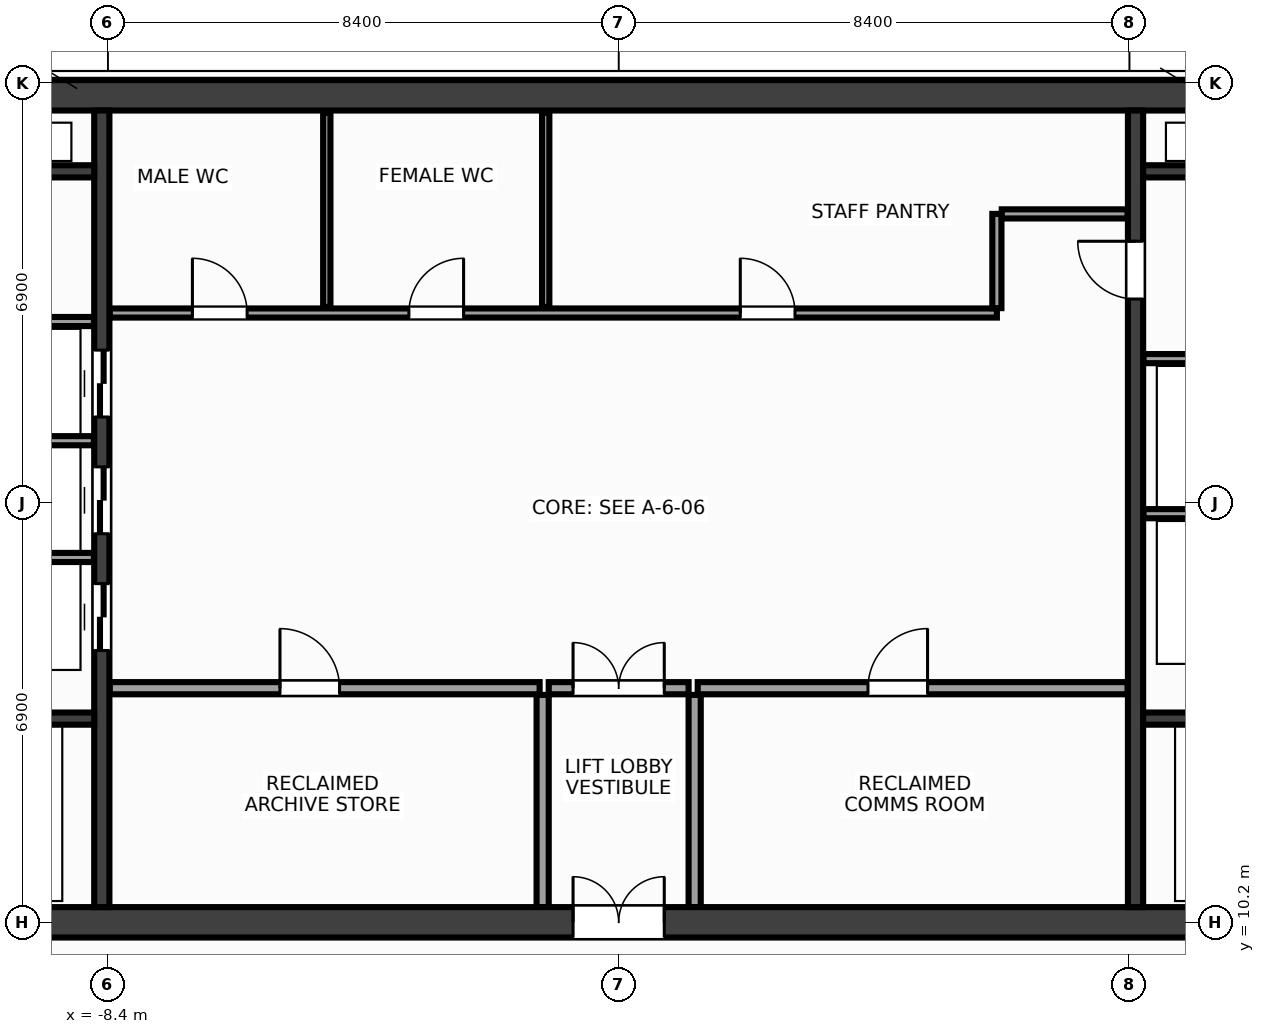
"""IFC4 building model, lengths in metres.
Left out: names, types, materials, properties, quantities, classifications, styles, units other than length and angle.
Written with IfcOpenShell. Run it as: python <this file> out.ifc"""

import sys

from ifc_helpers import new_model, si_unit, direction, frame, frame_2d, origin, place, context, subcontext, project, spatial, rectangle, extrude, source, transform, mapped, element, fill, save


model = new_model("IFC4")
c1 = context("Model", 3, precision=1e-05, world=origin(), true_north=direction((0.0, 1.0)))
c2 = subcontext(c1, "Body", "Model", "MODEL_VIEW")
j1 = project(units=[si_unit("LENGTHUNIT", "METRE"), si_unit("PLANEANGLEUNIT", "RADIAN")], contexts=[c1])
p1 = place(None, origin())
s1 = spatial("IfcSite", under=j1, at=p1, CompositionType="ELEMENT")
p2 = place(p1, origin())
s2 = spatial("IfcBuilding", under=s1, at=p2, CompositionType="ELEMENT")
p3 = place(p2, frame((0.0, 0.0, 264.8)))
s3 = spatial("IfcBuildingStorey", under=s2, at=p3, CompositionType="ELEMENT", Elevation=264.8)
m1 = source(origin(), c2, "Body", "SweptSolid", [
    extrude(rectangle(XDim=31.7, YDim=0.5, at=frame_2d((15.85, 0.0))), origin(), (0.0, 0.0, 1.0), 3.6),
])
p4 = place(p3, frame((-15.85, 23.8, 0.0), z_axis=(0.0, 0.0, 1.0), x_axis=(1.0, 0.0, 0.0)))
e1 = element("IfcWall", 1, at=p4, inside=s3, PredefinedType="SHEAR", context=c2, shape_type="MappedRepresentation", body=[
    mapped(m1, transform((0.0, 0.0, 0.0), x_axis=(1.0, 0.0, 0.0), y_axis=(0.0, 1.0, 0.0), z_axis=(0.0, 0.0, 1.0), scale=1.0)),
])
p5 = place(p3, frame((-15.85, 10.2, 0.0), z_axis=(0.0, 0.0, 1.0), x_axis=(1.0, 0.0, 0.0)))
e2 = element("IfcWall", 2, at=p5, inside=s3, PredefinedType="SHEAR", context=c2, shape_type="MappedRepresentation", body=[
    mapped(m1, transform((0.0, 0.0, 0.0), x_axis=(1.0, 0.0, 0.0), y_axis=(0.0, 1.0, 0.0), z_axis=(0.0, 0.0, 1.0), scale=1.0)),
])
p6 = place(p5, frame((1.7, 0.0, 0.0)))
e3 = element("IfcOpeningElement", 3, at=p6, cuts=e2, PredefinedType="OPENING", context=c2, shape_type="SweptSolid", body=[
    extrude(rectangle(XDim=1.6, YDim=2.15, at=frame_2d((0.8, 1.075))), frame((0.0, 0.262, 0.0), z_axis=(0.0, -1.0, 0.0), x_axis=(1.0, 0.0, 0.0)), (0.0, 0.0, 1.0), 0.524),
])
p7 = place(p5, frame((28.4, 0.0, 0.0)))
e4 = element("IfcOpeningElement", 4, at=p7, cuts=e2, PredefinedType="OPENING", context=c2, shape_type="SweptSolid", body=[
    extrude(rectangle(XDim=1.6, YDim=2.15, at=frame_2d((0.8, 1.075))), frame((0.0, 0.262, 0.0), z_axis=(0.0, -1.0, 0.0), x_axis=(1.0, 0.0, 0.0)), (0.0, 0.0, 1.0), 0.524),
])
p8 = place(p5, frame((15.1, 0.0, 0.0)))
e5 = element("IfcOpeningElement", 5, at=p8, cuts=e2, PredefinedType="OPENING", context=c2, shape_type="SweptSolid", body=[
    extrude(rectangle(XDim=1.5, YDim=2.2, at=frame_2d((0.75, 1.1))), frame((0.0, 0.262, 0.0), z_axis=(0.0, -1.0, 0.0), x_axis=(1.0, 0.0, 0.0)), (0.0, 0.0, 1.0), 0.524),
])
m2 = source(origin(), c2, "Body", "SweptSolid", [
    extrude(rectangle(XDim=13.1, YDim=0.25, at=frame_2d((6.55, 0.0))), origin(), (0.0, 0.0, 1.0), 3.6),
])
p9 = place(p3, frame((-8.5, 10.45, 0.0), z_axis=(0.0, 0.0, 1.0), x_axis=(0.0, 1.0, 0.0)))
e6 = element("IfcWall", 6, at=p9, inside=s3, PredefinedType="SHEAR", context=c2, shape_type="MappedRepresentation", body=[
    mapped(m2, transform((0.0, 0.0, 0.0), x_axis=(1.0, 0.0, 0.0), y_axis=(0.0, 1.0, 0.0), z_axis=(0.0, 0.0, 1.0), scale=1.0)),
])
p10 = place(p9, frame((4.22, 0.0, 0.0)))
e7 = element("IfcOpeningElement", 7, at=p10, cuts=e6, PredefinedType="OPENING", context=c2, shape_type="SweptSolid", body=[
    extrude(rectangle(XDim=1.1, YDim=2.15, at=frame_2d((0.55, 1.075))), frame((0.0, 0.137, 0.0), z_axis=(0.0, -1.0, 0.0), x_axis=(1.0, 0.0, 0.0)), (0.0, 0.0, 1.0), 0.274),
])
p11 = place(p9, frame((6.14, 0.0, 0.0)))
e8 = element("IfcOpeningElement", 8, at=p11, cuts=e6, PredefinedType="OPENING", context=c2, shape_type="SweptSolid", body=[
    extrude(rectangle(XDim=1.1, YDim=2.15, at=frame_2d((0.55, 1.075))), frame((0.0, 0.137, 0.0), z_axis=(0.0, -1.0, 0.0), x_axis=(1.0, 0.0, 0.0)), (0.0, 0.0, 1.0), 0.274),
])
p12 = place(p9, frame((8.06, 0.0, 0.0)))
e9 = element("IfcOpeningElement", 9, at=p12, cuts=e6, PredefinedType="OPENING", context=c2, shape_type="SweptSolid", body=[
    extrude(rectangle(XDim=1.1, YDim=2.15, at=frame_2d((0.55, 1.075))), frame((0.0, 0.137, 0.0), z_axis=(0.0, -1.0, 0.0), x_axis=(1.0, 0.0, 0.0)), (0.0, 0.0, 1.0), 0.274),
])
p13 = place(p3, frame((8.5, 10.45, 0.0), z_axis=(0.0, 0.0, 1.0), x_axis=(0.0, 1.0, 0.0)))
e10 = element("IfcWall", 10, at=p13, inside=s3, PredefinedType="SHEAR", context=c2, shape_type="MappedRepresentation", body=[
    mapped(m2, transform((0.0, 0.0, 0.0), x_axis=(1.0, 0.0, 0.0), y_axis=(0.0, 1.0, 0.0), z_axis=(0.0, 0.0, 1.0), scale=1.0)),
])
p14 = place(p13, frame((10.0, 0.0, 0.0)))
e11 = element("IfcOpeningElement", 11, at=p14, cuts=e10, PredefinedType="OPENING", context=c2, shape_type="SweptSolid", body=[
    extrude(rectangle(XDim=0.95, YDim=2.15, at=frame_2d((0.475, 1.075))), frame((0.0, 0.137, 0.0), z_axis=(0.0, -1.0, 0.0), x_axis=(1.0, 0.0, 0.0)), (0.0, 0.0, 1.0), 0.274),
])
m3 = source(origin(), c2, "Body", "SweptSolid", [
    extrude(rectangle(XDim=2.825, YDim=0.2, at=frame_2d((1.413, 0.0))), origin(), (0.0, 0.0, 1.0), 3.6),
])
for number, where, z_axis, x_axis in (
    (12, (-11.45, 13.55, 0.0), (0.0, 0.0, 1.0), (1.0, 0.0, 0.0)),
    (13, (8.625, 13.55, 0.0), (0.0, 0.0, 1.0), (1.0, 0.0, 0.0)),
):
    element("IfcWall", number, at=place(p3, frame(where, z_axis=z_axis, x_axis=x_axis)), inside=s3, PredefinedType="SHEAR", context=c2, shape_type="MappedRepresentation", body=[
        mapped(m3, transform((0.0, 0.0, 0.0), x_axis=(1.0, 0.0, 0.0), y_axis=(0.0, 1.0, 0.0), z_axis=(0.0, 0.0, 1.0), scale=1.0)),
    ])
m4 = source(origin(), c2, "Body", "SweptSolid", [
    extrude(rectangle(XDim=3.02, YDim=0.2, at=frame_2d((1.51, 0.0))), origin(), (0.0, 0.0, 1.0), 3.6),
])
for number, where, z_axis, x_axis in (
    (14, (-11.645, 22.55, 0.0), (0.0, 0.0, 1.0), (1.0, 0.0, 0.0)),
    (15, (8.625, 22.55, 0.0), (0.0, 0.0, 1.0), (1.0, 0.0, 0.0)),
):
    element("IfcWall", number, at=place(p3, frame(where, z_axis=z_axis, x_axis=x_axis)), inside=s3, PredefinedType="SHEAR", context=c2, shape_type="MappedRepresentation", body=[
        mapped(m4, transform((0.0, 0.0, 0.0), x_axis=(1.0, 0.0, 0.0), y_axis=(0.0, 1.0, 0.0), z_axis=(0.0, 0.0, 1.0), scale=1.0)),
    ])
m5 = source(origin(), c2, "Body", "SweptSolid", [
    extrude(rectangle(XDim=3.01, YDim=0.15, at=frame_2d((1.505, 0.0))), origin(), (0.0, 0.0, 1.0), 3.37),
])
for number, where, z_axis, x_axis in (
    (16, (-11.64, 16.2, 0.0), (0.0, 0.0, 1.0), (1.0, 0.0, 0.0)),
    (17, (-11.64, 18.12, 0.0), (0.0, 0.0, 1.0), (1.0, 0.0, 0.0)),
    (18, (-11.64, 20.08, 0.0), (0.0, 0.0, 1.0), (1.0, 0.0, 0.0)),
    (19, (8.63, 16.92, 0.0), (0.0, 0.0, 1.0), (1.0, 0.0, 0.0)),
    (20, (8.63, 19.47, 0.0), (0.0, 0.0, 1.0), (1.0, 0.0, 0.0)),
):
    element("IfcWall", number, at=place(p3, frame(where, z_axis=z_axis, x_axis=x_axis)), inside=s3, PredefinedType="PARTITIONING", context=c2, shape_type="MappedRepresentation", body=[
        mapped(m5, transform((0.0, 0.0, 0.0), x_axis=(1.0, 0.0, 0.0), y_axis=(0.0, 1.0, 0.0), z_axis=(0.0, 0.0, 1.0), scale=1.0)),
    ])
m6 = source(origin(), c2, "Body", "SweptSolid", [
    extrude(rectangle(XDim=7.07, YDim=0.2, at=frame_2d((3.535, 0.0))), origin(), (0.0, 0.0, 1.0), 3.37),
])
p15 = place(p3, frame((-8.37, 14.05, 0.0), z_axis=(0.0, 0.0, 1.0), x_axis=(1.0, 0.0, 0.0)))
e21 = element("IfcWall", 21, at=p15, inside=s3, PredefinedType="PARTITIONING", context=c2, shape_type="MappedRepresentation", body=[
    mapped(m6, transform((0.0, 0.0, 0.0), x_axis=(1.0, 0.0, 0.0), y_axis=(0.0, 1.0, 0.0), z_axis=(0.0, 0.0, 1.0), scale=1.0)),
])
p16 = place(p15, frame((2.8, 0.0, 0.0)))
e22 = element("IfcOpeningElement", 22, at=p16, cuts=e21, PredefinedType="OPENING", context=c2, shape_type="SweptSolid", body=[
    extrude(rectangle(XDim=0.98, YDim=2.15, at=frame_2d((0.49, 1.075))), frame((0.0, 0.112, 0.0), z_axis=(0.0, -1.0, 0.0), x_axis=(1.0, 0.0, 0.0)), (0.0, 0.0, 1.0), 0.224),
])
p17 = place(p3, frame((1.3, 14.05, 0.0), z_axis=(0.0, 0.0, 1.0), x_axis=(1.0, 0.0, 0.0)))
e23 = element("IfcWall", 23, at=p17, inside=s3, PredefinedType="PARTITIONING", context=c2, shape_type="MappedRepresentation", body=[
    mapped(m6, transform((0.0, 0.0, 0.0), x_axis=(1.0, 0.0, 0.0), y_axis=(0.0, 1.0, 0.0), z_axis=(0.0, 0.0, 1.0), scale=1.0)),
])
p18 = place(p17, frame((2.8, 0.0, 0.0)))
e24 = element("IfcOpeningElement", 24, at=p18, cuts=e23, PredefinedType="OPENING", context=c2, shape_type="SweptSolid", body=[
    extrude(rectangle(XDim=0.98, YDim=2.15, at=frame_2d((0.49, 1.075))), frame((0.0, 0.112, 0.0), z_axis=(0.0, -1.0, 0.0), x_axis=(1.0, 0.0, 0.0)), (0.0, 0.0, 1.0), 0.224),
])
m7 = source(origin(), c2, "Body", "SweptSolid", [
    extrude(rectangle(XDim=3.49, YDim=0.2, at=frame_2d((1.745, 0.0))), origin(), (0.0, 0.0, 1.0), 3.37),
])
for number, where, z_axis, x_axis in (
    (25, (-1.25, 10.45, 0.0), (0.0, 0.0, 1.0), (0.0, 1.0, 0.0)),
    (26, (1.25, 10.45, 0.0), (0.0, 0.0, 1.0), (0.0, 1.0, 0.0)),
):
    element("IfcWall", number, at=place(p3, frame(where, z_axis=z_axis, x_axis=x_axis)), inside=s3, PredefinedType="PARTITIONING", context=c2, shape_type="MappedRepresentation", body=[
        mapped(m7, transform((0.0, 0.0, 0.0), x_axis=(1.0, 0.0, 0.0), y_axis=(0.0, 1.0, 0.0), z_axis=(0.0, 0.0, 1.0), scale=1.0)),
    ])
m8 = source(origin(), c2, "Body", "SweptSolid", [
    extrude(rectangle(XDim=2.3, YDim=0.2, at=frame_2d((1.15, 0.0))), origin(), (0.0, 0.0, 1.0), 3.37),
])
p19 = place(p3, frame((-1.15, 14.05, 0.0), z_axis=(0.0, 0.0, 1.0), x_axis=(1.0, 0.0, 0.0)))
e27 = element("IfcWall", 27, at=p19, inside=s3, PredefinedType="PARTITIONING", context=c2, shape_type="MappedRepresentation", body=[
    mapped(m8, transform((0.0, 0.0, 0.0), x_axis=(1.0, 0.0, 0.0), y_axis=(0.0, 1.0, 0.0), z_axis=(0.0, 0.0, 1.0), scale=1.0)),
])
p20 = place(p19, frame((0.4, 0.0, 0.0)))
e28 = element("IfcOpeningElement", 28, at=p20, cuts=e27, PredefinedType="OPENING", context=c2, shape_type="SweptSolid", body=[
    extrude(rectangle(XDim=1.5, YDim=2.2, at=frame_2d((0.75, 1.1))), frame((0.0, 0.112, 0.0), z_axis=(0.0, -1.0, 0.0), x_axis=(1.0, 0.0, 0.0)), (0.0, 0.0, 1.0), 0.224),
])
m9 = source(origin(), c2, "Body", "SweptSolid", [
    extrude(rectangle(XDim=14.59, YDim=0.15, at=frame_2d((7.295, 0.0))), origin(), (0.0, 0.0, 1.0), 3.37),
])
p21 = place(p3, frame((-8.37, 20.22, 0.0), z_axis=(0.0, 0.0, 1.0), x_axis=(1.0, 0.0, 0.0)))
e29 = element("IfcWall", 29, at=p21, inside=s3, PredefinedType="PARTITIONING", context=c2, shape_type="MappedRepresentation", body=[
    mapped(m9, transform((0.0, 0.0, 0.0), x_axis=(1.0, 0.0, 0.0), y_axis=(0.0, 1.0, 0.0), z_axis=(0.0, 0.0, 1.0), scale=1.0)),
])
p22 = place(p21, frame((1.36, 0.0, 0.0)))
e30 = element("IfcOpeningElement", 30, at=p22, cuts=e29, PredefinedType="OPENING", context=c2, shape_type="SweptSolid", body=[
    extrude(rectangle(XDim=0.9, YDim=2.15, at=frame_2d((0.45, 1.075))), frame((0.0, 0.087, 0.0), z_axis=(0.0, -1.0, 0.0), x_axis=(1.0, 0.0, 0.0)), (0.0, 0.0, 1.0), 0.174),
])
p23 = place(p21, frame((4.92, 0.0, 0.0)))
e31 = element("IfcOpeningElement", 31, at=p23, cuts=e29, PredefinedType="OPENING", context=c2, shape_type="SweptSolid", body=[
    extrude(rectangle(XDim=0.9, YDim=2.15, at=frame_2d((0.45, 1.075))), frame((0.0, 0.087, 0.0), z_axis=(0.0, -1.0, 0.0), x_axis=(1.0, 0.0, 0.0)), (0.0, 0.0, 1.0), 0.174),
])
p24 = place(p21, frame((10.37, 0.0, 0.0)))
e32 = element("IfcOpeningElement", 32, at=p24, cuts=e29, PredefinedType="OPENING", context=c2, shape_type="SweptSolid", body=[
    extrude(rectangle(XDim=0.9, YDim=2.15, at=frame_2d((0.45, 1.075))), frame((0.0, 0.087, 0.0), z_axis=(0.0, -1.0, 0.0), x_axis=(1.0, 0.0, 0.0)), (0.0, 0.0, 1.0), 0.174),
])
m10 = source(origin(), c2, "Body", "SweptSolid", [
    extrude(rectangle(XDim=1.55, YDim=0.15, at=frame_2d((0.775, 0.0))), origin(), (0.0, 0.0, 1.0), 3.37),
])
p25 = place(p3, frame((6.22, 20.3, 0.0), z_axis=(0.0, 0.0, 1.0), x_axis=(0.0, 1.0, 0.0)))
e33 = element("IfcWall", 33, at=p25, inside=s3, PredefinedType="PARTITIONING", context=c2, shape_type="MappedRepresentation", body=[
    mapped(m10, transform((0.0, 0.0, 0.0), x_axis=(1.0, 0.0, 0.0), y_axis=(0.0, 1.0, 0.0), z_axis=(0.0, 0.0, 1.0), scale=1.0)),
])
m11 = source(origin(), c2, "Body", "SweptSolid", [
    extrude(rectangle(XDim=2.07, YDim=0.15, at=frame_2d((1.035, 0.0))), origin(), (0.0, 0.0, 1.0), 3.37),
])
p26 = place(p3, frame((6.3, 21.85, 0.0), z_axis=(0.0, 0.0, 1.0), x_axis=(1.0, 0.0, 0.0)))
e34 = element("IfcWall", 34, at=p26, inside=s3, PredefinedType="PARTITIONING", context=c2, shape_type="MappedRepresentation", body=[
    mapped(m11, transform((0.0, 0.0, 0.0), x_axis=(1.0, 0.0, 0.0), y_axis=(0.0, 1.0, 0.0), z_axis=(0.0, 0.0, 1.0), scale=1.0)),
])
m12 = source(origin(), c2, "Body", "SweptSolid", [
    extrude(rectangle(XDim=3.19, YDim=0.12, at=frame_2d((1.595, 0.0))), origin(), (0.0, 0.0, 1.0), 3.37),
])
for number, where, z_axis, x_axis in (
    (35, (-4.8, 20.32, 0.0), (0.0, 0.0, 1.0), (0.0, 1.0, 0.0)),
    (36, (-1.2, 20.32, 0.0), (0.0, 0.0, 1.0), (0.0, 1.0, 0.0)),
):
    element("IfcWall", number, at=place(p3, frame(where, z_axis=z_axis, x_axis=x_axis)), inside=s3, PredefinedType="PARTITIONING", context=c2, shape_type="MappedRepresentation", body=[
        mapped(m12, transform((0.0, 0.0, 0.0), x_axis=(1.0, 0.0, 0.0), y_axis=(0.0, 1.0, 0.0), z_axis=(0.0, 0.0, 1.0), scale=1.0)),
    ])
m13 = source(origin(), c2, "Body", "SweptSolid", [
    extrude(rectangle(XDim=1.1, YDim=2.15, at=frame_2d((0.55, 1.075))), frame((0.0, 0.025, 0.0), z_axis=(0.0, -1.0, 0.0), x_axis=(1.0, 0.0, 0.0)), (0.0, 0.0, 1.0), 0.05),
])
p27 = place(p10, origin())
e37 = element("IfcDoor", 37, at=p27, inside=s3, OperationType="DOUBLE_DOOR_SLIDING", PredefinedType="DOOR", context=c2, shape_type="MappedRepresentation", body=[
    mapped(m13, transform((0.0, 0.0, 0.0), x_axis=(1.0, 0.0, 0.0), y_axis=(0.0, 1.0, 0.0), z_axis=(0.0, 0.0, 1.0), scale=1.0)),
])
fill(e7, e37)
p28 = place(p11, origin())
e38 = element("IfcDoor", 38, at=p28, inside=s3, OperationType="DOUBLE_DOOR_SLIDING", PredefinedType="DOOR", context=c2, shape_type="MappedRepresentation", body=[
    mapped(m13, transform((0.0, 0.0, 0.0), x_axis=(1.0, 0.0, 0.0), y_axis=(0.0, 1.0, 0.0), z_axis=(0.0, 0.0, 1.0), scale=1.0)),
])
fill(e8, e38)
p29 = place(p12, origin())
e39 = element("IfcDoor", 39, at=p29, inside=s3, OperationType="DOUBLE_DOOR_SLIDING", PredefinedType="DOOR", context=c2, shape_type="MappedRepresentation", body=[
    mapped(m13, transform((0.0, 0.0, 0.0), x_axis=(1.0, 0.0, 0.0), y_axis=(0.0, 1.0, 0.0), z_axis=(0.0, 0.0, 1.0), scale=1.0)),
])
fill(e9, e39)
m14 = source(origin(), c2, "Body", "SweptSolid", [
    extrude(rectangle(XDim=0.95, YDim=2.15, at=frame_2d((0.475, 1.075))), frame((0.0, 0.025, 0.0), z_axis=(0.0, -1.0, 0.0), x_axis=(1.0, 0.0, 0.0)), (0.0, 0.0, 1.0), 0.05),
])
p30 = place(p14, origin())
e40 = element("IfcDoor", 40, at=p30, inside=s3, OperationType="SINGLE_SWING_RIGHT", PredefinedType="DOOR", context=c2, shape_type="MappedRepresentation", body=[
    mapped(m14, transform((0.0, 0.0, 0.0), x_axis=(1.0, 0.0, 0.0), y_axis=(0.0, 1.0, 0.0), z_axis=(0.0, 0.0, 1.0), scale=1.0)),
])
fill(e11, e40)
m15 = source(origin(), c2, "Body", "SweptSolid", [
    extrude(rectangle(XDim=0.98, YDim=2.15, at=frame_2d((0.49, 1.075))), frame((0.0, 0.025, 0.0), z_axis=(0.0, -1.0, 0.0), x_axis=(1.0, 0.0, 0.0)), (0.0, 0.0, 1.0), 0.05),
])
p31 = place(p16, origin())
e41 = element("IfcDoor", 41, at=p31, inside=s3, OperationType="SINGLE_SWING_LEFT", PredefinedType="DOOR", context=c2, shape_type="MappedRepresentation", body=[
    mapped(m15, transform((0.0, 0.0, 0.0), x_axis=(1.0, 0.0, 0.0), y_axis=(0.0, 1.0, 0.0), z_axis=(0.0, 0.0, 1.0), scale=1.0)),
])
fill(e22, e41)
p32 = place(p18, origin())
e42 = element("IfcDoor", 42, at=p32, inside=s3, OperationType="SINGLE_SWING_RIGHT", PredefinedType="DOOR", context=c2, shape_type="MappedRepresentation", body=[
    mapped(m15, transform((0.0, 0.0, 0.0), x_axis=(1.0, 0.0, 0.0), y_axis=(0.0, 1.0, 0.0), z_axis=(0.0, 0.0, 1.0), scale=1.0)),
])
fill(e24, e42)
m16 = source(origin(), c2, "Body", "SweptSolid", [
    extrude(rectangle(XDim=1.5, YDim=2.2, at=frame_2d((0.75, 1.1))), frame((0.0, 0.025, 0.0), z_axis=(0.0, -1.0, 0.0), x_axis=(1.0, 0.0, 0.0)), (0.0, 0.0, 1.0), 0.05),
])
p33 = place(p20, origin())
e43 = element("IfcDoor", 43, at=p33, inside=s3, OperationType="DOUBLE_DOOR_SINGLE_SWING", PredefinedType="DOOR", context=c2, shape_type="MappedRepresentation", body=[
    mapped(m16, transform((0.0, 0.0, 0.0), x_axis=(1.0, 0.0, 0.0), y_axis=(0.0, 1.0, 0.0), z_axis=(0.0, 0.0, 1.0), scale=1.0)),
])
fill(e28, e43)
p34 = place(p8, origin())
e44 = element("IfcDoor", 44, at=p34, inside=s3, OperationType="DOUBLE_DOOR_SINGLE_SWING", PredefinedType="DOOR", context=c2, shape_type="MappedRepresentation", body=[
    mapped(m16, transform((0.0, 0.0, 0.0), x_axis=(1.0, 0.0, 0.0), y_axis=(0.0, 1.0, 0.0), z_axis=(0.0, 0.0, 1.0), scale=1.0)),
])
fill(e5, e44)
m17 = source(origin(), c2, "Body", "SweptSolid", [
    extrude(rectangle(XDim=0.9, YDim=2.15, at=frame_2d((0.45, 1.075))), frame((0.0, 0.025, 0.0), z_axis=(0.0, -1.0, 0.0), x_axis=(1.0, 0.0, 0.0)), (0.0, 0.0, 1.0), 0.05),
])
p35 = place(p22, origin())
e45 = element("IfcDoor", 45, at=p35, inside=s3, OperationType="SINGLE_SWING_LEFT", PredefinedType="DOOR", context=c2, shape_type="MappedRepresentation", body=[
    mapped(m17, transform((0.0, 0.0, 0.0), x_axis=(1.0, 0.0, 0.0), y_axis=(0.0, 1.0, 0.0), z_axis=(0.0, 0.0, 1.0), scale=1.0)),
])
fill(e30, e45)
p36 = place(p23, origin())
e46 = element("IfcDoor", 46, at=p36, inside=s3, OperationType="SINGLE_SWING_RIGHT", PredefinedType="DOOR", context=c2, shape_type="MappedRepresentation", body=[
    mapped(m17, transform((0.0, 0.0, 0.0), x_axis=(1.0, 0.0, 0.0), y_axis=(0.0, 1.0, 0.0), z_axis=(0.0, 0.0, 1.0), scale=1.0)),
])
fill(e31, e46)
p37 = place(p24, origin())
e47 = element("IfcDoor", 47, at=p37, inside=s3, OperationType="SINGLE_SWING_LEFT", PredefinedType="DOOR", context=c2, shape_type="MappedRepresentation", body=[
    mapped(m17, transform((0.0, 0.0, 0.0), x_axis=(1.0, 0.0, 0.0), y_axis=(0.0, 1.0, 0.0), z_axis=(0.0, 0.0, 1.0), scale=1.0)),
])
fill(e32, e47)
save(model, sys.argv[1])
